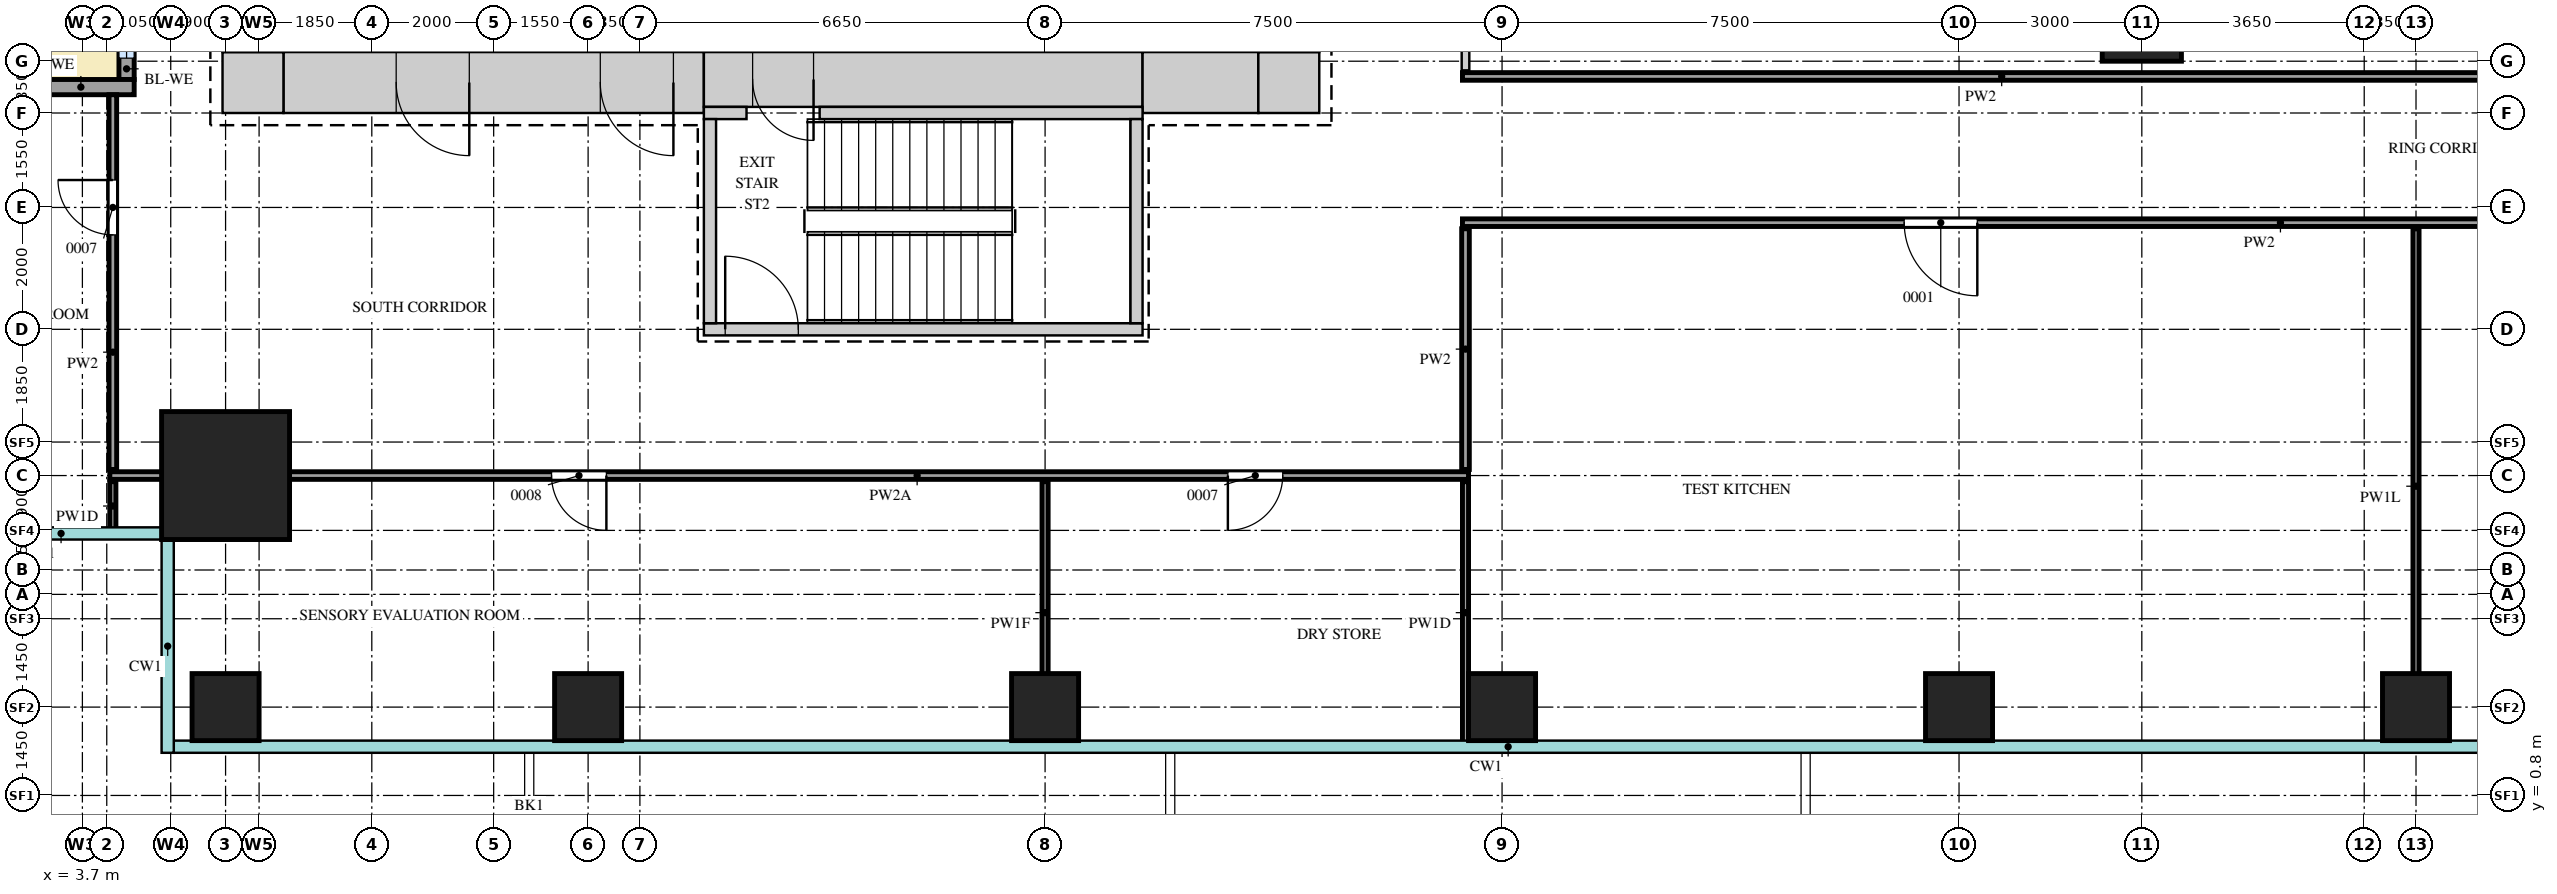
"""IFC4 building model, lengths in metres.
Left out: names, types, materials, properties, quantities, classifications, styles, units other than length and angle.
Written with IfcOpenShell. Run it as: python <this file> out.ifc"""

import sys

from ifc_helpers import new_model, si_unit, direction, frame, frame_2d, origin, origin_2d, place, context, subcontext, project, spatial, rectangle, extrude, source, transform, mapped, element, fill, save


model = new_model("IFC4")
c1 = context("Model", 3, precision=1e-05, world=origin(), true_north=direction((0.0, 1.0)))
c2 = subcontext(c1, "Body", "Model", "MODEL_VIEW")
j1 = project(units=[si_unit("LENGTHUNIT", "METRE"), si_unit("PLANEANGLEUNIT", "RADIAN")], contexts=[c1])
p1 = place(None, origin())
s1 = spatial("IfcSite", under=j1, at=p1, CompositionType="ELEMENT")
p2 = place(p1, origin())
s2 = spatial("IfcBuilding", under=s1, at=p2, CompositionType="ELEMENT")
p3 = place(p2, frame((0.0, 0.0, 119.1)))
s3 = spatial("IfcBuildingStorey", under=s2, at=p3, CompositionType="ELEMENT", Elevation=119.1)
m1 = source(origin(), c2, "Body", "SweptSolid", [
    extrude(rectangle(XDim=6.9, YDim=1.0, at=frame_2d((3.45, 0.0))), origin(), (0.0, 0.0, 1.0), 4.1),
])
p4 = place(p3, frame((7.0, 12.5, 0.0), z_axis=(0.0, 0.0, 1.0), x_axis=(1.0, 0.0, 0.0)))
e1 = element("IfcWall", 1, at=p4, inside=s3, PredefinedType="SHEAR", context=c2, shape_type="MappedRepresentation", body=[
    mapped(m1, transform((0.0, 0.0, 0.0))),
])
m2 = source(origin(), c2, "Body", "SweptSolid", [
    extrude(rectangle(XDim=1.2, YDim=2.1, at=frame_2d((0.6, 1.05))), frame((0.0, 0.51, 0.0), z_axis=(0.0, -1.0, 0.0), x_axis=(1.0, 0.0, 0.0)), (0.0, 0.0, 1.0), 1.02),
])
p5 = place(p4, frame((5.2, 0.0, 0.0)))
e2 = element("IfcOpeningElement", 2, at=p5, cuts=e1, PredefinedType="OPENING", context=c2, shape_type="MappedRepresentation", body=[
    mapped(m2, transform((0.0, 0.0, 0.0))),
])
p6 = place(p4, frame((1.85, 0.0, 0.0)))
e3 = element("IfcOpeningElement", 3, at=p6, cuts=e1, PredefinedType="OPENING", context=c2, shape_type="MappedRepresentation", body=[
    mapped(m2, transform((0.0, 0.0, 0.0))),
])
m3 = source(origin(), c2, "Body", "SweptSolid", [
    extrude(rectangle(XDim=7.2, YDim=0.9, at=frame_2d((3.6, 0.0))), origin(), (0.0, 0.0, 1.0), 4.1),
])
p7 = place(p3, frame((13.9, 12.55, 0.0), z_axis=(0.0, 0.0, 1.0), x_axis=(1.0, 0.0, 0.0)))
e4 = element("IfcWall", 4, at=p7, inside=s3, PredefinedType="SHEAR", context=c2, shape_type="MappedRepresentation", body=[
    mapped(m3, transform((0.0, 0.0, 0.0))),
])
m4 = source(origin(), c2, "Body", "SweptSolid", [
    extrude(rectangle(XDim=1.0, YDim=2.1, at=frame_2d((0.5, 1.05))), frame((0.0, 0.46, 0.0), z_axis=(0.0, -1.0, 0.0), x_axis=(1.0, 0.0, 0.0)), (0.0, 0.0, 1.0), 0.92),
])
p8 = place(p7, frame((0.8, 0.0, 0.0)))
e5 = element("IfcOpeningElement", 5, at=p8, cuts=e4, PredefinedType="OPENING", context=c2, shape_type="MappedRepresentation", body=[
    mapped(m4, transform((0.0, 0.0, 0.0))),
])
m5 = source(origin(), c2, "Body", "SweptSolid", [
    extrude(rectangle(XDim=1.9, YDim=1.0, at=frame_2d((0.95, 0.0))), origin(), (0.0, 0.0, 1.0), 4.1),
])
p9 = place(p3, frame((21.1, 12.5, 0.0), z_axis=(0.0, 0.0, 1.0), x_axis=(1.0, 0.0, 0.0)))
e6 = element("IfcWall", 6, at=p9, inside=s3, PredefinedType="SHEAR", context=c2, shape_type="MappedRepresentation", body=[
    mapped(m5, transform((0.0, 0.0, 0.0))),
])
m6 = source(origin(), c2, "Body", "SweptSolid", [
    extrude(rectangle(XDim=1.0, YDim=1.0, at=frame_2d((0.5, 0.0))), origin(), (0.0, 0.0, 1.0), 4.1),
])
for number, where, z_axis, x_axis in (
    (7, (23.0, 12.5, 0.0), (0.0, 0.0, 1.0), (1.0, 0.0, 0.0)),
    (8, (6.0, 12.5, 0.0), (0.0, 0.0, 1.0), (1.0, 0.0, 0.0)),
):
    element("IfcWall", number, at=place(p3, frame(where, z_axis=z_axis, x_axis=x_axis)), inside=s3, PredefinedType="SHEAR", context=c2, shape_type="MappedRepresentation", body=[
        mapped(m6, transform((0.0, 0.0, 0.0))),
    ])
m7 = source(origin(), c2, "Body", "SweptSolid", [
    extrude(rectangle(XDim=0.7, YDim=0.2, at=frame_2d((0.35, 0.0))), origin(), (0.0, 0.0, 1.0), 4.1),
])
p10 = place(p3, frame((13.9, 12.0, 0.0), z_axis=(0.0, 0.0, 1.0), x_axis=(1.0, 0.0, 0.0)))
e9 = element("IfcWall", 9, at=p10, inside=s3, PredefinedType="SHEAR", context=c2, shape_type="MappedRepresentation", body=[
    mapped(m7, transform((0.0, 0.0, 0.0))),
])
m8 = source(origin(), c2, "Body", "SweptSolid", [
    extrude(rectangle(XDim=5.3, YDim=0.2, at=frame_2d((2.65, 0.0))), origin(), (0.0, 0.0, 1.0), 4.1),
])
p11 = place(p3, frame((15.8, 12.0, 0.0), z_axis=(0.0, 0.0, 1.0), x_axis=(1.0, 0.0, 0.0)))
e10 = element("IfcWall", 10, at=p11, inside=s3, PredefinedType="SHEAR", context=c2, shape_type="MappedRepresentation", body=[
    mapped(m8, transform((0.0, 0.0, 0.0))),
])
m9 = source(origin(), c2, "Body", "SweptSolid", [
    extrude(rectangle(XDim=7.2, YDim=0.2, at=frame_2d((3.6, 0.0))), origin(), (0.0, 0.0, 1.0), 4.1),
])
p12 = place(p3, frame((13.9, 8.45, 0.0), z_axis=(0.0, 0.0, 1.0), x_axis=(1.0, 0.0, 0.0)))
e11 = element("IfcWall", 11, at=p12, inside=s3, PredefinedType="SHEAR", context=c2, shape_type="MappedRepresentation", body=[
    mapped(m9, transform((0.0, 0.0, 0.0))),
])
m10 = source(origin(), c2, "Body", "SweptSolid", [
    extrude(rectangle(XDim=1.2, YDim=2.1, at=frame_2d((0.6, 1.05))), frame((0.0, 0.11, 0.0), z_axis=(0.0, -1.0, 0.0), x_axis=(1.0, 0.0, 0.0)), (0.0, 0.0, 1.0), 0.22),
])
p13 = place(p12, frame((0.35, 0.0, 0.0)))
e12 = element("IfcOpeningElement", 12, at=p13, cuts=e11, PredefinedType="OPENING", context=c2, shape_type="MappedRepresentation", body=[
    mapped(m10, transform((0.0, 0.0, 0.0))),
])
m11 = source(origin(), c2, "Body", "SweptSolid", [
    extrude(rectangle(XDim=3.35, YDim=0.2, at=frame_2d((1.675, 0.0))), origin(), (0.0, 0.0, 1.0), 4.1),
])
for number, where, z_axis, x_axis in (
    (13, (21.0, 8.55, 0.0), (0.0, 0.0, 1.0), (0.0, 1.0, 0.0)),
    (14, (14.0, 8.55, 0.0), (0.0, 0.0, 1.0), (0.0, 1.0, 0.0)),
):
    element("IfcWall", number, at=place(p3, frame(where, z_axis=z_axis, x_axis=x_axis)), inside=s3, PredefinedType="SHEAR", context=c2, shape_type="MappedRepresentation", body=[
        mapped(m11, transform((0.0, 0.0, 0.0))),
    ])
m12 = source(origin(), c2, "Body", "SweptSolid", [
    extrude(rectangle(XDim=2.1, YDim=2.1, at=origin_2d()), origin(), (0.0, 0.0, 1.0), 4.4),
])
p14 = place(p3, frame((6.05, 6.05, 0.0), z_axis=(0.0, 0.0, 1.0), x_axis=(1.0, 0.0, 0.0)))
e15 = element("IfcColumn", 15, at=p14, inside=s3, PredefinedType="COLUMN", context=c2, shape_type="MappedRepresentation", body=[
    mapped(m12, transform((0.0, 0.0, 0.0))),
])
m13 = source(origin(), c2, "Body", "SweptSolid", [
    extrude(rectangle(XDim=1.1, YDim=1.1, at=origin_2d()), origin(), (0.0, 0.0, 1.0), 4.1),
])
for number, where, z_axis, x_axis in (
    (16, (6.05, 2.25, 0.0), (0.0, 0.0, 1.0), (1.0, 0.0, 0.0)),
    (17, (12.0, 2.25, 0.0), (0.0, 0.0, 1.0), (1.0, 0.0, 0.0)),
    (18, (19.5, 2.25, 0.0), (0.0, 0.0, 1.0), (1.0, 0.0, 0.0)),
    (19, (27.0, 2.25, 0.0), (0.0, 0.0, 1.0), (1.0, 0.0, 0.0)),
    (20, (34.5, 2.25, 0.0), (0.0, 0.0, 1.0), (1.0, 0.0, 0.0)),
    (21, (42.0, 2.25, 0.0), (0.0, 0.0, 1.0), (1.0, 0.0, 0.0)),
):
    element("IfcColumn", number, at=place(p3, frame(where, z_axis=z_axis, x_axis=x_axis)), inside=s3, PredefinedType="COLUMN", context=c2, shape_type="MappedRepresentation", body=[
        mapped(m13, transform((0.0, 0.0, 0.0))),
    ])
m14 = source(origin(), c2, "Body", "SweptSolid", [
    extrude(rectangle(XDim=1.3, YDim=1.3, at=origin_2d()), origin(), (0.0, 0.0, 1.0), 4.1),
])
p15 = place(p3, frame((37.5, 13.5, 0.0), z_axis=(0.0, 0.0, 1.0), x_axis=(1.0, 0.0, 0.0)))
e22 = element("IfcColumn", 22, at=p15, inside=s3, PredefinedType="COLUMN", context=c2, shape_type="MappedRepresentation", body=[
    mapped(m14, transform((0.0, 0.0, 0.0))),
])
m15 = source(origin(), c2, "Body", "SweptSolid", [
    extrude(rectangle(XDim=6.4, YDim=0.25, at=frame_2d((3.2, 0.0))), origin(), (0.0, 0.0, 1.0), 3.5),
])
p16 = place(p3, frame((4.425, 12.55, 0.0), z_axis=(0.0, 0.0, 1.0), x_axis=(0.0, 1.0, 0.0)))
e23 = element("IfcWall", 23, at=p16, inside=s3, PredefinedType="SOLIDWALL", context=c2, shape_type="MappedRepresentation", body=[
    mapped(m15, transform((0.0, 0.0, 0.0))),
])
m16 = source(origin(), c2, "Body", "SweptSolid", [
    extrude(rectangle(XDim=1.65, YDim=2.4, at=frame_2d((0.825, 1.2))), frame((0.0, 0.135, 0.0), z_axis=(0.0, -1.0, 0.0), x_axis=(1.0, 0.0, 0.0)), (0.0, 0.0, 1.0), 0.27),
])
p17 = place(p16, frame((0.35, 0.0, 0.0)))
e24 = element("IfcOpeningElement", 24, at=p17, cuts=e23, PredefinedType="OPENING", context=c2, shape_type="MappedRepresentation", body=[
    mapped(m16, transform((0.0, 0.0, 0.0))),
])
p18 = place(p16, frame((4.4, 0.0, 0.0)))
e25 = element("IfcOpeningElement", 25, at=p18, cuts=e23, PredefinedType="OPENING", context=c2, shape_type="MappedRepresentation", body=[
    mapped(m16, transform((0.0, 0.0, 0.0))),
])
m17 = source(origin(), c2, "Body", "SweptSolid", [
    extrude(rectangle(XDim=1.8, YDim=2.4, at=frame_2d((0.9, 1.2))), frame((0.0, 0.135, 0.0), z_axis=(0.0, -1.0, 0.0), x_axis=(1.0, 0.0, 0.0)), (0.0, 0.0, 1.0), 0.27),
])
p19 = place(p16, frame((2.3, 0.0, 0.0)))
e26 = element("IfcOpeningElement", 26, at=p19, cuts=e23, PredefinedType="OPENING", context=c2, shape_type="MappedRepresentation", body=[
    mapped(m17, transform((0.0, 0.0, 0.0))),
])
m18 = source(origin(), c2, "Body", "SweptSolid", [
    extrude(rectangle(XDim=1.75, YDim=0.25, at=frame_2d((0.875, 0.0))), origin(), (0.0, 0.0, 1.0), 3.5),
])
p20 = place(p3, frame((2.8, 12.425, 0.0), z_axis=(0.0, 0.0, 1.0), x_axis=(1.0, 0.0, 0.0)))
e27 = element("IfcWall", 27, at=p20, inside=s3, PredefinedType="SOLIDWALL", context=c2, shape_type="MappedRepresentation", body=[
    mapped(m18, transform((0.0, 0.0, 0.0))),
])
m19 = source(origin(), c2, "Body", "SweptSolid", [
    extrude(rectangle(XDim=4.3, YDim=0.1, at=frame_2d((2.15, 0.0))), origin(), (0.0, 0.0, 1.0), 3.77),
])
p21 = place(p3, frame((19.5, 1.65, 0.0), z_axis=(0.0, 0.0, 1.0), x_axis=(0.0, 1.0, 0.0)))
e28 = element("IfcWall", 28, at=p21, inside=s3, PredefinedType="PARTITIONING", context=c2, shape_type="MappedRepresentation", body=[
    mapped(m19, transform((0.0, 0.0, 0.0))),
])
m20 = source(origin(), c2, "Body", "SweptSolid", [
    extrude(rectangle(XDim=4.3, YDim=0.1, at=frame_2d((2.15, 0.0))), origin(), (0.0, 0.0, 1.0), 4.2),
])
p22 = place(p3, frame((26.4, 1.65, 0.0), z_axis=(0.0, 0.0, 1.0), x_axis=(0.0, 1.0, 0.0)))
e29 = element("IfcWall", 29, at=p22, inside=s3, PredefinedType="PARTITIONING", context=c2, shape_type="MappedRepresentation", body=[
    mapped(m20, transform((0.0, 0.0, 0.0))),
])
m21 = source(origin(), c2, "Body", "SweptSolid", [
    extrude(rectangle(XDim=8.45, YDim=0.1, at=frame_2d((4.225, 0.0))), origin(), (0.0, 0.0, 1.0), 3.6),
])
p23 = place(p3, frame((42.0, 1.65, 0.0), z_axis=(0.0, 0.0, 1.0), x_axis=(0.0, 1.0, 0.0)))
e30 = element("IfcWall", 30, at=p23, inside=s3, PredefinedType="PARTITIONING", context=c2, shape_type="MappedRepresentation", body=[
    mapped(m21, transform((0.0, 0.0, 0.0))),
])
m22 = source(origin(), c2, "Body", "SweptSolid", [
    extrude(rectangle(XDim=0.8, YDim=0.1, at=frame_2d((0.4, 0.0))), origin(), (0.0, 0.0, 1.0), 4.2),
])
p24 = place(p3, frame((4.2, 5.15, 0.0), z_axis=(0.0, 0.0, 1.0), x_axis=(0.0, 1.0, 0.0)))
e31 = element("IfcWall", 31, at=p24, inside=s3, PredefinedType="PARTITIONING", context=c2, shape_type="MappedRepresentation", body=[
    mapped(m22, transform((0.0, 0.0, 0.0))),
])
m23 = source(origin(), c2, "Body", "SweptSolid", [
    extrude(rectangle(XDim=22.3, YDim=0.125, at=frame_2d((11.15, 0.0))), origin(), (0.0, 0.0, 1.0), 3.55),
])
p25 = place(p3, frame((4.15, 6.05, 0.0), z_axis=(0.0, 0.0, 1.0), x_axis=(1.0, 0.0, 0.0)))
e32 = element("IfcWall", 32, at=p25, inside=s3, PredefinedType="PARTITIONING", context=c2, shape_type="MappedRepresentation", body=[
    mapped(m23, transform((0.0, 0.0, 0.0))),
])
m24 = source(origin(), c2, "Body", "SweptSolid", [
    extrude(rectangle(XDim=0.9, YDim=2.1, at=frame_2d((0.45, 1.05))), frame((0.0, 0.073, 0.0), z_axis=(0.0, -1.0, 0.0), x_axis=(1.0, 0.0, 0.0)), (0.0, 0.0, 1.0), 0.145),
])
p26 = place(p25, frame((7.25, 0.0, 0.0)))
e33 = element("IfcOpeningElement", 33, at=p26, cuts=e32, PredefinedType="OPENING", context=c2, shape_type="MappedRepresentation", body=[
    mapped(m24, transform((0.0, 0.0, 0.0))),
])
p27 = place(p25, frame((18.35, 0.0, 0.0)))
e34 = element("IfcOpeningElement", 34, at=p27, cuts=e32, PredefinedType="OPENING", context=c2, shape_type="MappedRepresentation", body=[
    mapped(m24, transform((0.0, 0.0, 0.0))),
])
m25 = source(origin(), c2, "Body", "SweptSolid", [
    extrude(rectangle(XDim=6.15, YDim=0.125, at=frame_2d((3.075, 0.0))), origin(), (0.0, 0.0, 1.0), 4.2),
])
p28 = place(p3, frame((4.2, 6.15, 0.0), z_axis=(0.0, 0.0, 1.0), x_axis=(0.0, 1.0, 0.0)))
e35 = element("IfcWall", 35, at=p28, inside=s3, PredefinedType="PARTITIONING", context=c2, shape_type="MappedRepresentation", body=[
    mapped(m25, transform((0.0, 0.0, 0.0))),
])
p29 = place(p28, frame((3.85, 0.0, 0.0)))
e36 = element("IfcOpeningElement", 36, at=p29, cuts=e35, PredefinedType="OPENING", context=c2, shape_type="MappedRepresentation", body=[
    mapped(m24, transform((0.0, 0.0, 0.0))),
])
m26 = source(origin(), c2, "Body", "SweptSolid", [
    extrude(rectangle(XDim=3.95, YDim=0.125, at=frame_2d((1.975, 0.0))), origin(), (0.0, 0.0, 1.0), 4.2),
])
p30 = place(p3, frame((26.4, 6.15, 0.0), z_axis=(0.0, 0.0, 1.0), x_axis=(0.0, 1.0, 0.0)))
e37 = element("IfcWall", 37, at=p30, inside=s3, PredefinedType="PARTITIONING", context=c2, shape_type="MappedRepresentation", body=[
    mapped(m26, transform((0.0, 0.0, 0.0))),
])
m27 = source(origin(), c2, "Body", "SweptSolid", [
    extrude(rectangle(XDim=20.0, YDim=0.125, at=frame_2d((10.0, 0.0))), origin(), (0.0, 0.0, 1.0), 4.2),
])
p31 = place(p3, frame((26.35, 10.2, 0.0), z_axis=(0.0, 0.0, 1.0), x_axis=(1.0, 0.0, 0.0)))
e38 = element("IfcWall", 38, at=p31, inside=s3, PredefinedType="PARTITIONING", context=c2, shape_type="MappedRepresentation", body=[
    mapped(m27, transform((0.0, 0.0, 0.0))),
])
m28 = source(origin(), c2, "Body", "SweptSolid", [
    extrude(rectangle(XDim=1.2, YDim=2.1, at=frame_2d((0.6, 1.05))), frame((0.0, 0.073, 0.0), z_axis=(0.0, -1.0, 0.0), x_axis=(1.0, 0.0, 0.0)), (0.0, 0.0, 1.0), 0.145),
])
p32 = place(p31, frame((7.25, 0.0, 0.0)))
e39 = element("IfcOpeningElement", 39, at=p32, cuts=e38, PredefinedType="OPENING", context=c2, shape_type="MappedRepresentation", body=[
    mapped(m28, transform((0.0, 0.0, 0.0))),
])
p33 = place(p31, frame((18.4, 0.0, 0.0)))
e40 = element("IfcOpeningElement", 40, at=p33, cuts=e38, PredefinedType="OPENING", context=c2, shape_type="MappedRepresentation", body=[
    mapped(m28, transform((0.0, 0.0, 0.0))),
])
m29 = source(origin(), c2, "Body", "SweptSolid", [
    extrude(rectangle(XDim=17.7, YDim=0.125, at=frame_2d((8.85, 0.0))), origin(), (0.0, 0.0, 1.0), 4.2),
])
p34 = place(p3, frame((26.35, 12.6, 0.0), z_axis=(0.0, 0.0, 1.0), x_axis=(1.0, 0.0, 0.0)))
e41 = element("IfcWall", 41, at=p34, inside=s3, PredefinedType="PARTITIONING", context=c2, shape_type="MappedRepresentation", body=[
    mapped(m29, transform((0.0, 0.0, 0.0))),
])
m30 = source(origin(), c2, "Body", "SweptSolid", [
    extrude(rectangle(XDim=23.2, YDim=0.125, at=frame_2d((11.6, 0.0))), origin(), (0.0, 0.0, 1.0), 4.2),
])
p35 = place(p3, frame((26.4, 12.7, 0.0), z_axis=(0.0, 0.0, 1.0), x_axis=(0.0, 1.0, 0.0)))
e42 = element("IfcWall", 42, at=p35, inside=s3, PredefinedType="PARTITIONING", context=c2, shape_type="MappedRepresentation", body=[
    mapped(m30, transform((0.0, 0.0, 0.0))),
])
p36 = place(p35, frame((6.65, 0.0, 0.0)))
e43 = element("IfcOpeningElement", 43, at=p36, cuts=e42, PredefinedType="OPENING", context=c2, shape_type="MappedRepresentation", body=[
    mapped(m28, transform((0.0, 0.0, 0.0))),
])
m31 = source(origin(), c2, "Body", "SweptSolid", [
    extrude(rectangle(XDim=1.65, YDim=2.4, at=frame_2d((0.825, 1.2))), frame((0.0, 0.03, 0.0), z_axis=(0.0, -1.0, 0.0), x_axis=(1.0, 0.0, 0.0)), (0.0, 0.0, 1.0), 0.06),
])
p37 = place(p17, origin())
e44 = element("IfcWindow", 44, at=p37, inside=s3, PartitioningType="SINGLE_PANEL", PredefinedType="WINDOW", context=c2, shape_type="MappedRepresentation", body=[
    mapped(m31, transform((0.0, 0.0, 0.0))),
])
fill(e24, e44)
m32 = source(origin(), c2, "Body", "SweptSolid", [
    extrude(rectangle(XDim=1.2, YDim=2.1, at=frame_2d((0.6, 1.05))), frame((0.0, 0.45, 0.0), z_axis=(0.0, -1.0, 0.0), x_axis=(1.0, 0.0, 0.0)), (0.0, 0.0, 1.0), 0.9),
])
p38 = place(p5, origin())
e45 = element("IfcDoor", 45, at=p38, inside=s3, OperationType="SINGLE_SWING_RIGHT", PredefinedType="DOOR", context=c2, shape_type="MappedRepresentation", body=[
    mapped(m32, transform((0.0, 0.0, 0.0))),
])
fill(e2, e45)
p39 = place(p6, origin())
e46 = element("IfcDoor", 46, at=p39, inside=s3, OperationType="SINGLE_SWING_RIGHT", PredefinedType="DOOR", context=c2, shape_type="MappedRepresentation", body=[
    mapped(m32, transform((0.0, 0.0, 0.0))),
])
fill(e3, e46)
m33 = source(origin(), c2, "Body", "SweptSolid", [
    extrude(rectangle(XDim=1.0, YDim=2.1, at=frame_2d((0.5, 1.05))), frame((0.0, 0.4, 0.0), z_axis=(0.0, -1.0, 0.0), x_axis=(1.0, 0.0, 0.0)), (0.0, 0.0, 1.0), 0.8),
])
p40 = place(p8, origin())
e47 = element("IfcDoor", 47, at=p40, inside=s3, OperationType="SINGLE_SWING_RIGHT", PredefinedType="DOOR", context=c2, shape_type="MappedRepresentation", body=[
    mapped(m33, transform((0.0, 0.0, 0.0))),
])
fill(e5, e47)
m34 = source(origin(), c2, "Body", "SweptSolid", [
    extrude(rectangle(XDim=1.2, YDim=2.1, at=frame_2d((0.6, 1.05))), frame((0.0, 0.025, 0.0), z_axis=(0.0, -1.0, 0.0), x_axis=(1.0, 0.0, 0.0)), (0.0, 0.0, 1.0), 0.05),
])
p41 = place(p32, origin())
e48 = element("IfcDoor", 48, at=p41, inside=s3, OperationType="SINGLE_SWING_RIGHT", PredefinedType="DOOR", context=c2, shape_type="MappedRepresentation", body=[
    mapped(m34, transform((0.0, 0.0, 0.0))),
])
fill(e39, e48)
m35 = source(origin(), c2, "Body", "SweptSolid", [
    extrude(rectangle(XDim=0.9, YDim=2.1, at=frame_2d((0.45, 1.05))), frame((0.0, 0.025, 0.0), z_axis=(0.0, -1.0, 0.0), x_axis=(1.0, 0.0, 0.0)), (0.0, 0.0, 1.0), 0.05),
])
p42 = place(p26, origin())
e49 = element("IfcDoor", 49, at=p42, inside=s3, OperationType="SINGLE_SWING_RIGHT", PredefinedType="DOOR", context=c2, shape_type="MappedRepresentation", body=[
    mapped(m35, transform((0.0, 0.0, 0.0))),
])
fill(e33, e49)
p43 = place(p27, origin())
e50 = element("IfcDoor", 50, at=p43, inside=s3, OperationType="SINGLE_SWING_LEFT", PredefinedType="DOOR", context=c2, shape_type="MappedRepresentation", body=[
    mapped(m35, transform((0.0, 0.0, 0.0))),
])
fill(e34, e50)
p44 = place(p29, origin())
e51 = element("IfcDoor", 51, at=p44, inside=s3, OperationType="SINGLE_SWING_LEFT", PredefinedType="DOOR", context=c2, shape_type="MappedRepresentation", body=[
    mapped(m35, transform((0.0, 0.0, 0.0))),
])
fill(e36, e51)
p45 = place(p13, origin())
e52 = element("IfcDoor", 52, at=p45, inside=s3, OperationType="SINGLE_SWING_RIGHT", PredefinedType="DOOR", context=c2, shape_type="MappedRepresentation", body=[
    mapped(m34, transform((0.0, 0.0, 0.0))),
])
fill(e12, e52)
save(model, sys.argv[1])
